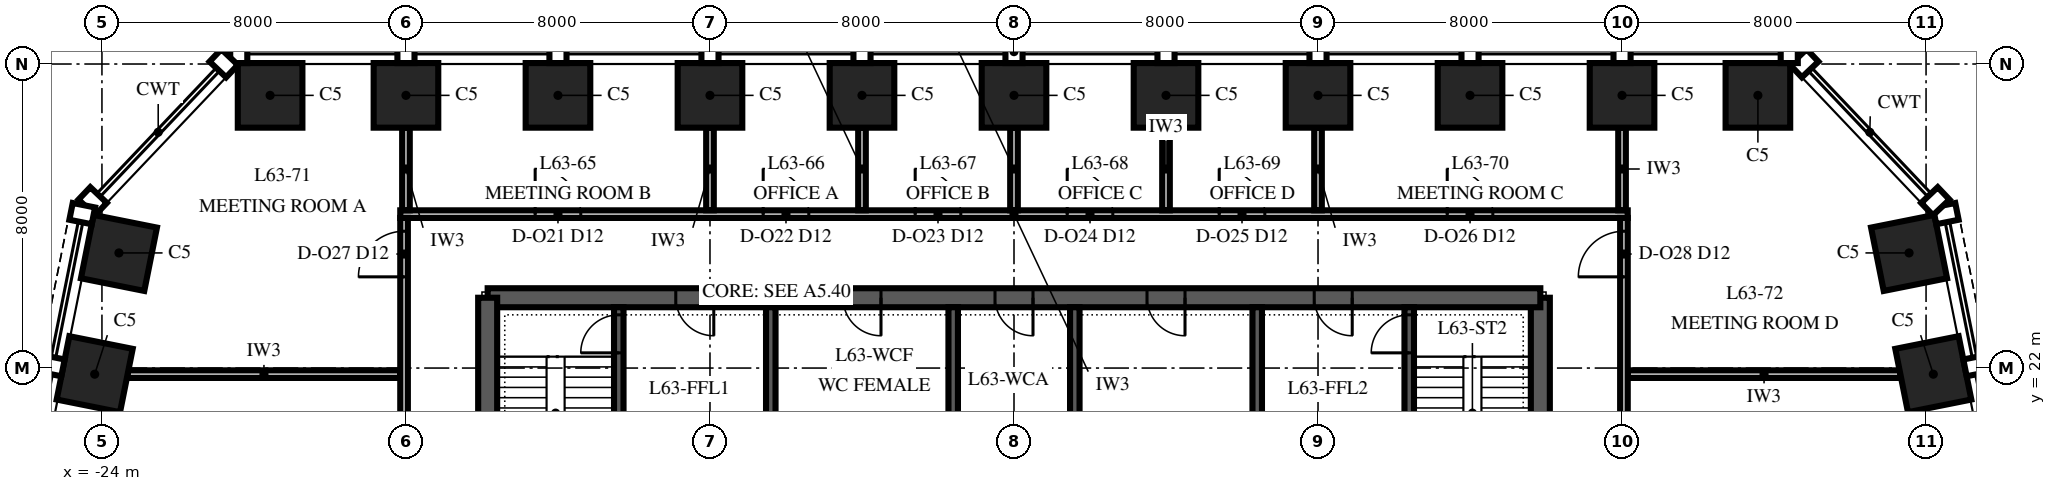
"""IFC4 building model, lengths in metres.
Left out: names, types, materials, properties, quantities, classifications, styles, units other than length and angle.
Written with IfcOpenShell. Run it as: python <this file> out.ifc"""

import sys

from ifc_helpers import new_model, si_unit, direction, frame, frame_2d, origin, origin_2d, place, context, subcontext, project, spatial, polyline, rectangle, outline, extrude, element, fill, save


model = new_model("IFC4")
c1 = context("Model", 3, precision=1e-05, world=origin(), true_north=direction((0.0, 1.0)))
c2 = subcontext(c1, "Body", "Model", "MODEL_VIEW")
j1 = project(units=[si_unit("LENGTHUNIT", "METRE"), si_unit("PLANEANGLEUNIT", "RADIAN")], contexts=[c1])
p1 = place(None, origin())
s1 = spatial("IfcSite", under=j1, at=p1, CompositionType="ELEMENT")
p2 = place(p1, origin())
s2 = spatial("IfcBuilding", under=s1, at=p2, CompositionType="ELEMENT")
p3 = place(p2, frame((0.0, 0.0, 272.0)))
s3 = spatial("IfcBuildingStorey", under=s2, at=p3, CompositionType="ELEMENT", Elevation=272.0)
for number, where, z_axis, x_axis in (
    (1, (24.191, 21.838, 0.0), (0.0, 0.0, 1.0), (-0.196, 0.981, 0.0)),
    (2, (23.553, 25.029, 0.0), (0.0, 0.0, 1.0), (-0.196, 0.981, 0.0)),
    (3, (19.575, 29.175, 0.0), (0.0, 0.0, 1.0), (-1.0, 0.0, 0.0)),
    (4, (16.0, 29.175, 0.0), (0.0, 0.0, 1.0), (-1.0, 0.0, 0.0)),
    (5, (12.0, 29.175, 0.0), (0.0, 0.0, 1.0), (-1.0, 0.0, 0.0)),
    (6, (8.0, 29.175, 0.0), (0.0, 0.0, 1.0), (-1.0, 0.0, 0.0)),
    (7, (4.0, 29.175, 0.0), (0.0, 0.0, 1.0), (-1.0, 0.0, 0.0)),
    (8, (0.0, 29.175, 0.0), (0.0, 0.0, 1.0), (-1.0, 0.0, 0.0)),
    (9, (-4.0, 29.175, 0.0), (0.0, 0.0, 1.0), (-1.0, 0.0, 0.0)),
    (10, (-8.0, 29.175, 0.0), (0.0, 0.0, 1.0), (-1.0, 0.0, 0.0)),
    (11, (-12.0, 29.175, 0.0), (0.0, 0.0, 1.0), (-1.0, 0.0, 0.0)),
    (12, (-16.0, 29.175, 0.0), (0.0, 0.0, 1.0), (-1.0, 0.0, 0.0)),
    (13, (-19.575, 29.175, 0.0), (0.0, 0.0, 1.0), (-1.0, 0.0, 0.0)),
    (14, (-23.553, 25.029, 0.0), (0.0, 0.0, 1.0), (-0.196, -0.981, 0.0)),
    (15, (-24.191, 21.838, 0.0), (0.0, 0.0, 1.0), (-0.196, -0.981, 0.0)),
):
    element("IfcColumn", number, at=place(p3, frame(where, z_axis=z_axis, x_axis=x_axis)), inside=s3, PredefinedType="COLUMN", context=c2, shape_type="SweptSolid", body=[
        extrude(rectangle(XDim=1.7, YDim=1.7, at=origin_2d()), origin(), (0.0, 0.0, 1.0), 4.0),
    ])
p4 = place(p3, frame((13.85, 6.15, 0.0), z_axis=(0.0, 0.0, 1.0), x_axis=(0.0, 1.0, 0.0)))
e16 = element("IfcWall", 16, at=p4, inside=s3, PredefinedType="SHEAR", context=c2, shape_type="SweptSolid", body=[
    extrude(outline(polyline([(0.0, -0.25), (17.7, -0.25), (17.7, 0.0), (17.45, 0.0), (17.45, 0.25), (0.25, 0.25), (0.25, 0.0), (0.0, 0.0), (0.0, -0.25)])), origin(), (0.0, 0.0, 1.0), 4.0),
])
p5 = place(p4, frame((4.15, 0.0, 0.0)))
e17 = element("IfcOpeningElement", 17, at=p5, cuts=e16, PredefinedType="OPENING", context=c2, shape_type="SweptSolid", body=[
    extrude(rectangle(XDim=1.8, YDim=2.4, at=frame_2d((0.9, 1.2))), frame((0.0, 0.265, 0.0), z_axis=(0.0, -1.0, 0.0), x_axis=(1.0, 0.0, 0.0)), (0.0, 0.0, 1.0), 0.53),
])
p6 = place(p3, frame((13.85, 23.85, 0.0), z_axis=(0.0, 0.0, 1.0), x_axis=(-1.0, 0.0, 0.0)))
e18 = element("IfcWall", 18, at=p6, inside=s3, PredefinedType="SHEAR", context=c2, shape_type="SweptSolid", body=[
    extrude(rectangle(XDim=27.7, YDim=0.5, at=frame_2d((13.85, 0.0))), origin(), (0.0, 0.0, 1.0), 4.0),
])
p7 = place(p6, frame((21.75, 0.0, 0.0)))
e19 = element("IfcOpeningElement", 19, at=p7, cuts=e18, PredefinedType="OPENING", context=c2, shape_type="SweptSolid", body=[
    extrude(rectangle(XDim=1.0, YDim=2.1, at=frame_2d((0.5, 1.05))), frame((0.0, 0.265, 0.0), z_axis=(0.0, -1.0, 0.0), x_axis=(1.0, 0.0, 0.0)), (0.0, 0.0, 1.0), 0.53),
])
p8 = place(p6, frame((4.95, 0.0, 0.0)))
e20 = element("IfcOpeningElement", 20, at=p8, cuts=e18, PredefinedType="OPENING", context=c2, shape_type="SweptSolid", body=[
    extrude(rectangle(XDim=1.0, YDim=2.1, at=frame_2d((0.5, 1.05))), frame((0.0, 0.265, 0.0), z_axis=(0.0, -1.0, 0.0), x_axis=(1.0, 0.0, 0.0)), (0.0, 0.0, 1.0), 0.53),
])
p9 = place(p6, frame((17.35, 0.0, 0.0)))
e21 = element("IfcOpeningElement", 21, at=p9, cuts=e18, PredefinedType="OPENING", context=c2, shape_type="SweptSolid", body=[
    extrude(rectangle(XDim=1.0, YDim=2.1, at=frame_2d((0.5, 1.05))), frame((0.0, 0.265, 0.0), z_axis=(0.0, -1.0, 0.0), x_axis=(1.0, 0.0, 0.0)), (0.0, 0.0, 1.0), 0.53),
])
p10 = place(p6, frame((13.35, 0.0, 0.0)))
e22 = element("IfcOpeningElement", 22, at=p10, cuts=e18, PredefinedType="OPENING", context=c2, shape_type="SweptSolid", body=[
    extrude(rectangle(XDim=1.0, YDim=2.1, at=frame_2d((0.5, 1.05))), frame((0.0, 0.265, 0.0), z_axis=(0.0, -1.0, 0.0), x_axis=(1.0, 0.0, 0.0)), (0.0, 0.0, 1.0), 0.53),
])
p11 = place(p6, frame((9.35, 0.0, 0.0)))
e23 = element("IfcOpeningElement", 23, at=p11, cuts=e18, PredefinedType="OPENING", context=c2, shape_type="SweptSolid", body=[
    extrude(rectangle(XDim=1.0, YDim=2.1, at=frame_2d((0.5, 1.05))), frame((0.0, 0.265, 0.0), z_axis=(0.0, -1.0, 0.0), x_axis=(1.0, 0.0, 0.0)), (0.0, 0.0, 1.0), 0.53),
])
p12 = place(p3, frame((-13.85, 23.85, 0.0), z_axis=(0.0, 0.0, 1.0), x_axis=(0.0, -1.0, 0.0)))
e24 = element("IfcWall", 24, at=p12, inside=s3, PredefinedType="SHEAR", context=c2, shape_type="SweptSolid", body=[
    extrude(outline(polyline([(0.0, -0.25), (17.7, -0.25), (17.7, 0.0), (17.45, 0.0), (17.45, 0.25), (0.25, 0.25), (0.25, 0.0), (0.0, 0.0), (0.0, -0.25)])), origin(), (0.0, 0.0, 1.0), 4.0),
])
p13 = place(p12, frame((11.75, 0.0, 0.0)))
e25 = element("IfcOpeningElement", 25, at=p13, cuts=e24, PredefinedType="OPENING", context=c2, shape_type="SweptSolid", body=[
    extrude(rectangle(XDim=1.8, YDim=2.4, at=frame_2d((0.9, 1.2))), frame((0.0, 0.265, 0.0), z_axis=(0.0, -1.0, 0.0), x_axis=(1.0, 0.0, 0.0)), (0.0, 0.0, 1.0), 0.53),
])
p14 = place(p3, frame((-10.4, 16.125, 0.0), z_axis=(0.0, 0.0, 1.0), x_axis=(0.0, 1.0, 0.0)))
e26 = element("IfcWall", 26, at=p14, inside=s3, PredefinedType="SHEAR", context=c2, shape_type="SweptSolid", body=[
    extrude(rectangle(XDim=7.475, YDim=0.25, at=frame_2d((3.738, 0.0))), origin(), (0.0, 0.0, 1.0), 4.0),
])
p15 = place(p14, frame((6.275, 0.0, 0.0)))
e27 = element("IfcOpeningElement", 27, at=p15, cuts=e26, PredefinedType="OPENING", context=c2, shape_type="SweptSolid", body=[
    extrude(rectangle(XDim=1.0, YDim=2.1, at=frame_2d((0.5, 1.05))), frame((0.0, 0.14, 0.0), z_axis=(0.0, -1.0, 0.0), x_axis=(1.0, 0.0, 0.0)), (0.0, 0.0, 1.0), 0.28),
])
for number, where, z_axis, x_axis in (
    (28, (-6.4, 16.125, 0.0), (0.0, 0.0, 1.0), (0.0, 1.0, 0.0)),
    (29, (-1.6, 16.125, 0.0), (0.0, 0.0, 1.0), (0.0, 1.0, 0.0)),
    (30, (1.6, 16.125, 0.0), (0.0, 0.0, 1.0), (0.0, 1.0, 0.0)),
    (31, (6.4, 16.125, 0.0), (0.0, 0.0, 1.0), (0.0, 1.0, 0.0)),
):
    element("IfcWall", number, at=place(p3, frame(where, z_axis=z_axis, x_axis=x_axis)), inside=s3, PredefinedType="SHEAR", context=c2, shape_type="SweptSolid", body=[
        extrude(rectangle(XDim=7.475, YDim=0.25, at=frame_2d((3.738, 0.0))), origin(), (0.0, 0.0, 1.0), 4.0),
    ])
p16 = place(p3, frame((10.4, 16.125, 0.0), z_axis=(0.0, 0.0, 1.0), x_axis=(0.0, 1.0, 0.0)))
e32 = element("IfcWall", 32, at=p16, inside=s3, PredefinedType="SHEAR", context=c2, shape_type="SweptSolid", body=[
    extrude(rectangle(XDim=7.475, YDim=0.25, at=frame_2d((3.738, 0.0))), origin(), (0.0, 0.0, 1.0), 4.0),
])
p17 = place(p16, frame((6.275, 0.0, 0.0)))
e33 = element("IfcOpeningElement", 33, at=p17, cuts=e32, PredefinedType="OPENING", context=c2, shape_type="SweptSolid", body=[
    extrude(rectangle(XDim=1.0, YDim=2.1, at=frame_2d((0.5, 1.05))), frame((0.0, 0.14, 0.0), z_axis=(0.0, -1.0, 0.0), x_axis=(1.0, 0.0, 0.0)), (0.0, 0.0, 1.0), 0.28),
])
for number, where, z_axis, x_axis in (
    (34, (-23.324, 21.84, 0.0), (0.0, 0.0, 1.0), (1.0, 0.0, 0.0)),
    (35, (16.15, 21.84, 0.0), (0.0, 0.0, 1.0), (1.0, 0.0, 0.0)),
):
    element("IfcWall", number, at=place(p3, frame(where, z_axis=z_axis, x_axis=x_axis)), inside=s3, PredefinedType="PARTITIONING", context=c2, shape_type="SweptSolid", body=[
        extrude(rectangle(XDim=7.174, YDim=0.2, at=frame_2d((3.587, 0.0))), origin(), (0.0, 0.0, 1.0), 3.23),
    ])
p18 = place(p3, frame((-16.15, 26.05, 0.0), z_axis=(0.0, 0.0, 1.0), x_axis=(1.0, 0.0, 0.0)))
e36 = element("IfcWall", 36, at=p18, inside=s3, PredefinedType="PARTITIONING", context=c2, shape_type="SweptSolid", body=[
    extrude(rectangle(XDim=32.3, YDim=0.2, at=frame_2d((16.15, 0.0))), origin(), (0.0, 0.0, 1.0), 3.418),
])
p19 = place(p18, frame((3.55, 0.0, 0.0)))
e37 = element("IfcOpeningElement", 37, at=p19, cuts=e36, PredefinedType="OPENING", context=c2, shape_type="SweptSolid", body=[
    extrude(rectangle(XDim=1.2, YDim=2.4, at=frame_2d((0.6, 1.2))), frame((0.0, 0.115, 0.0), z_axis=(0.0, -1.0, 0.0), x_axis=(1.0, 0.0, 0.0)), (0.0, 0.0, 1.0), 0.23),
])
p20 = place(p18, frame((9.55, 0.0, 0.0)))
e38 = element("IfcOpeningElement", 38, at=p20, cuts=e36, PredefinedType="OPENING", context=c2, shape_type="SweptSolid", body=[
    extrude(rectangle(XDim=1.2, YDim=2.4, at=frame_2d((0.6, 1.2))), frame((0.0, 0.115, 0.0), z_axis=(0.0, -1.0, 0.0), x_axis=(1.0, 0.0, 0.0)), (0.0, 0.0, 1.0), 0.23),
])
p21 = place(p18, frame((13.55, 0.0, 0.0)))
e39 = element("IfcOpeningElement", 39, at=p21, cuts=e36, PredefinedType="OPENING", context=c2, shape_type="SweptSolid", body=[
    extrude(rectangle(XDim=1.2, YDim=2.4, at=frame_2d((0.6, 1.2))), frame((0.0, 0.115, 0.0), z_axis=(0.0, -1.0, 0.0), x_axis=(1.0, 0.0, 0.0)), (0.0, 0.0, 1.0), 0.23),
])
p22 = place(p18, frame((17.55, 0.0, 0.0)))
e40 = element("IfcOpeningElement", 40, at=p22, cuts=e36, PredefinedType="OPENING", context=c2, shape_type="SweptSolid", body=[
    extrude(rectangle(XDim=1.2, YDim=2.4, at=frame_2d((0.6, 1.2))), frame((0.0, 0.115, 0.0), z_axis=(0.0, -1.0, 0.0), x_axis=(1.0, 0.0, 0.0)), (0.0, 0.0, 1.0), 0.23),
])
p23 = place(p18, frame((21.55, 0.0, 0.0)))
e41 = element("IfcOpeningElement", 41, at=p23, cuts=e36, PredefinedType="OPENING", context=c2, shape_type="SweptSolid", body=[
    extrude(rectangle(XDim=1.2, YDim=2.4, at=frame_2d((0.6, 1.2))), frame((0.0, 0.115, 0.0), z_axis=(0.0, -1.0, 0.0), x_axis=(1.0, 0.0, 0.0)), (0.0, 0.0, 1.0), 0.23),
])
p24 = place(p18, frame((27.55, 0.0, 0.0)))
e42 = element("IfcOpeningElement", 42, at=p24, cuts=e36, PredefinedType="OPENING", context=c2, shape_type="SweptSolid", body=[
    extrude(rectangle(XDim=1.2, YDim=2.4, at=frame_2d((0.6, 1.2))), frame((0.0, 0.115, 0.0), z_axis=(0.0, -1.0, 0.0), x_axis=(1.0, 0.0, 0.0)), (0.0, 0.0, 1.0), 0.23),
])
p25 = place(p3, frame((-16.05, 4.05, 0.0), z_axis=(0.0, 0.0, 1.0), x_axis=(0.0, 1.0, 0.0)))
e43 = element("IfcWall", 43, at=p25, inside=s3, PredefinedType="PARTITIONING", context=c2, shape_type="SweptSolid", body=[
    extrude(rectangle(XDim=21.9, YDim=0.2, at=frame_2d((10.95, 0.0))), origin(), (0.0, 0.0, 1.0), 2.842),
])
p26 = place(p25, frame((20.35, 0.0, 0.0)))
e44 = element("IfcOpeningElement", 44, at=p26, cuts=e43, PredefinedType="OPENING", context=c2, shape_type="SweptSolid", body=[
    extrude(rectangle(XDim=1.2, YDim=2.4, at=frame_2d((0.6, 1.2))), frame((0.0, 0.115, 0.0), z_axis=(0.0, -1.0, 0.0), x_axis=(1.0, 0.0, 0.0)), (0.0, 0.0, 1.0), 0.23),
])
for number, where, z_axis, x_axis in (
    (45, (-16.0, 26.15, 0.0), (0.0, 0.0, 1.0), (0.0, 1.0, 0.0)),
    (46, (-8.0, 26.15, 0.0), (0.0, 0.0, 1.0), (0.0, 1.0, 0.0)),
    (47, (-4.0, 26.15, 0.0), (0.0, 0.0, 1.0), (0.0, 1.0, 0.0)),
    (48, (0.0, 26.15, 0.0), (0.0, 0.0, 1.0), (0.0, 1.0, 0.0)),
    (49, (4.0, 26.15, 0.0), (0.0, 0.0, 1.0), (0.0, 1.0, 0.0)),
    (50, (8.0, 26.15, 0.0), (0.0, 0.0, 1.0), (0.0, 1.0, 0.0)),
    (51, (16.0, 26.15, 0.0), (0.0, 0.0, 1.0), (0.0, 1.0, 0.0)),
):
    element("IfcWall", number, at=place(p3, frame(where, z_axis=z_axis, x_axis=x_axis)), inside=s3, PredefinedType="PARTITIONING", context=c2, shape_type="SweptSolid", body=[
        extrude(rectangle(XDim=2.175, YDim=0.2, at=frame_2d((1.087, 0.0))), origin(), (0.0, 0.0, 1.0), 3.418),
    ])
p27 = place(p3, frame((16.05, 4.05, 0.0), z_axis=(0.0, 0.0, 1.0), x_axis=(0.0, 1.0, 0.0)))
e52 = element("IfcWall", 52, at=p27, inside=s3, PredefinedType="PARTITIONING", context=c2, shape_type="SweptSolid", body=[
    extrude(rectangle(XDim=21.9, YDim=0.2, at=frame_2d((10.95, 0.0))), origin(), (0.0, 0.0, 1.0), 2.842),
])
p28 = place(p27, frame((20.35, 0.0, 0.0)))
e53 = element("IfcOpeningElement", 53, at=p28, cuts=e52, PredefinedType="OPENING", context=c2, shape_type="SweptSolid", body=[
    extrude(rectangle(XDim=1.2, YDim=2.4, at=frame_2d((0.6, 1.2))), frame((0.0, 0.115, 0.0), z_axis=(0.0, -1.0, 0.0), x_axis=(1.0, 0.0, 0.0)), (0.0, 0.0, 1.0), 0.23),
])
p29 = place(p7, origin())
e54 = element("IfcDoor", 54, at=p29, inside=s3, OperationType="SINGLE_SWING_RIGHT", PredefinedType="DOOR", context=c2, shape_type="SweptSolid", body=[
    extrude(rectangle(XDim=1.0, YDim=2.1, at=frame_2d((0.5, 1.05))), frame((0.0, 0.25, 0.0), z_axis=(0.0, -1.0, 0.0), x_axis=(1.0, 0.0, 0.0)), (0.0, 0.0, 1.0), 0.5),
])
fill(e19, e54)
p30 = place(p8, origin())
e55 = element("IfcDoor", 55, at=p30, inside=s3, OperationType="SINGLE_SWING_RIGHT", PredefinedType="DOOR", context=c2, shape_type="SweptSolid", body=[
    extrude(rectangle(XDim=1.0, YDim=2.1, at=frame_2d((0.5, 1.05))), frame((0.0, 0.25, 0.0), z_axis=(0.0, -1.0, 0.0), x_axis=(1.0, 0.0, 0.0)), (0.0, 0.0, 1.0), 0.5),
])
fill(e20, e55)
p31 = place(p9, origin())
e56 = element("IfcDoor", 56, at=p31, inside=s3, OperationType="SINGLE_SWING_LEFT", PredefinedType="DOOR", context=c2, shape_type="SweptSolid", body=[
    extrude(rectangle(XDim=1.0, YDim=2.1, at=frame_2d((0.5, 1.05))), frame((0.0, 0.25, 0.0), z_axis=(0.0, -1.0, 0.0), x_axis=(1.0, 0.0, 0.0)), (0.0, 0.0, 1.0), 0.5),
])
fill(e21, e56)
p32 = place(p10, origin())
e57 = element("IfcDoor", 57, at=p32, inside=s3, OperationType="SINGLE_SWING_LEFT", PredefinedType="DOOR", context=c2, shape_type="SweptSolid", body=[
    extrude(rectangle(XDim=1.0, YDim=2.1, at=frame_2d((0.5, 1.05))), frame((0.0, 0.25, 0.0), z_axis=(0.0, -1.0, 0.0), x_axis=(1.0, 0.0, 0.0)), (0.0, 0.0, 1.0), 0.5),
])
fill(e22, e57)
p33 = place(p11, origin())
e58 = element("IfcDoor", 58, at=p33, inside=s3, OperationType="SINGLE_SWING_LEFT", PredefinedType="DOOR", context=c2, shape_type="SweptSolid", body=[
    extrude(rectangle(XDim=1.0, YDim=2.1, at=frame_2d((0.5, 1.05))), frame((0.0, 0.25, 0.0), z_axis=(0.0, -1.0, 0.0), x_axis=(1.0, 0.0, 0.0)), (0.0, 0.0, 1.0), 0.5),
])
fill(e23, e58)
p34 = place(p15, origin())
e59 = element("IfcDoor", 59, at=p34, inside=s3, OperationType="SINGLE_SWING_LEFT", PredefinedType="DOOR", context=c2, shape_type="SweptSolid", body=[
    extrude(rectangle(XDim=1.0, YDim=2.1, at=frame_2d((0.5, 1.05))), frame((0.0, 0.125, 0.0), z_axis=(0.0, -1.0, 0.0), x_axis=(1.0, 0.0, 0.0)), (0.0, 0.0, 1.0), 0.25),
])
fill(e27, e59)
p35 = place(p17, origin())
e60 = element("IfcDoor", 60, at=p35, inside=s3, OperationType="SINGLE_SWING_LEFT", PredefinedType="DOOR", context=c2, shape_type="SweptSolid", body=[
    extrude(rectangle(XDim=1.0, YDim=2.1, at=frame_2d((0.5, 1.05))), frame((0.0, 0.125, 0.0), z_axis=(0.0, -1.0, 0.0), x_axis=(1.0, 0.0, 0.0)), (0.0, 0.0, 1.0), 0.25),
])
fill(e33, e60)
p36 = place(p19, origin())
e61 = element("IfcDoor", 61, at=p36, inside=s3, OperationType="SINGLE_SWING_LEFT", PredefinedType="DOOR", context=c2, shape_type="SweptSolid", body=[
    extrude(rectangle(XDim=1.2, YDim=2.4, at=frame_2d((0.6, 1.2))), frame((0.0, 0.1, 0.0), z_axis=(0.0, -1.0, 0.0), x_axis=(1.0, 0.0, 0.0)), (0.0, 0.0, 1.0), 0.199),
])
fill(e37, e61)
p37 = place(p20, origin())
e62 = element("IfcDoor", 62, at=p37, inside=s3, OperationType="SINGLE_SWING_LEFT", PredefinedType="DOOR", context=c2, shape_type="SweptSolid", body=[
    extrude(rectangle(XDim=1.2, YDim=2.4, at=frame_2d((0.6, 1.2))), frame((0.0, 0.1, 0.0), z_axis=(0.0, -1.0, 0.0), x_axis=(1.0, 0.0, 0.0)), (0.0, 0.0, 1.0), 0.199),
])
fill(e38, e62)
p38 = place(p21, origin())
e63 = element("IfcDoor", 63, at=p38, inside=s3, OperationType="SINGLE_SWING_LEFT", PredefinedType="DOOR", context=c2, shape_type="SweptSolid", body=[
    extrude(rectangle(XDim=1.2, YDim=2.4, at=frame_2d((0.6, 1.2))), frame((0.0, 0.1, 0.0), z_axis=(0.0, -1.0, 0.0), x_axis=(1.0, 0.0, 0.0)), (0.0, 0.0, 1.0), 0.199),
])
fill(e39, e63)
p39 = place(p22, origin())
e64 = element("IfcDoor", 64, at=p39, inside=s3, OperationType="SINGLE_SWING_LEFT", PredefinedType="DOOR", context=c2, shape_type="SweptSolid", body=[
    extrude(rectangle(XDim=1.2, YDim=2.4, at=frame_2d((0.6, 1.2))), frame((0.0, 0.1, 0.0), z_axis=(0.0, -1.0, 0.0), x_axis=(1.0, 0.0, 0.0)), (0.0, 0.0, 1.0), 0.199),
])
fill(e40, e64)
p40 = place(p23, origin())
e65 = element("IfcDoor", 65, at=p40, inside=s3, OperationType="SINGLE_SWING_LEFT", PredefinedType="DOOR", context=c2, shape_type="SweptSolid", body=[
    extrude(rectangle(XDim=1.2, YDim=2.4, at=frame_2d((0.6, 1.2))), frame((0.0, 0.1, 0.0), z_axis=(0.0, -1.0, 0.0), x_axis=(1.0, 0.0, 0.0)), (0.0, 0.0, 1.0), 0.199),
])
fill(e41, e65)
p41 = place(p24, origin())
e66 = element("IfcDoor", 66, at=p41, inside=s3, OperationType="SINGLE_SWING_LEFT", PredefinedType="DOOR", context=c2, shape_type="SweptSolid", body=[
    extrude(rectangle(XDim=1.2, YDim=2.4, at=frame_2d((0.6, 1.2))), frame((0.0, 0.1, 0.0), z_axis=(0.0, -1.0, 0.0), x_axis=(1.0, 0.0, 0.0)), (0.0, 0.0, 1.0), 0.199),
])
fill(e42, e66)
p42 = place(p26, origin())
e67 = element("IfcDoor", 67, at=p42, inside=s3, OperationType="SINGLE_SWING_LEFT", PredefinedType="DOOR", context=c2, shape_type="SweptSolid", body=[
    extrude(rectangle(XDim=1.2, YDim=2.4, at=frame_2d((0.6, 1.2))), frame((0.0, 0.1, 0.0), z_axis=(0.0, -1.0, 0.0), x_axis=(1.0, 0.0, 0.0)), (0.0, 0.0, 1.0), 0.199),
])
fill(e44, e67)
p43 = place(p28, origin())
e68 = element("IfcDoor", 68, at=p43, inside=s3, OperationType="SINGLE_SWING_LEFT", PredefinedType="DOOR", context=c2, shape_type="SweptSolid", body=[
    extrude(rectangle(XDim=1.2, YDim=2.4, at=frame_2d((0.6, 1.2))), frame((0.0, 0.1, 0.0), z_axis=(0.0, -1.0, 0.0), x_axis=(1.0, 0.0, 0.0)), (0.0, 0.0, 1.0), 0.199),
])
fill(e53, e68)
save(model, sys.argv[1])
